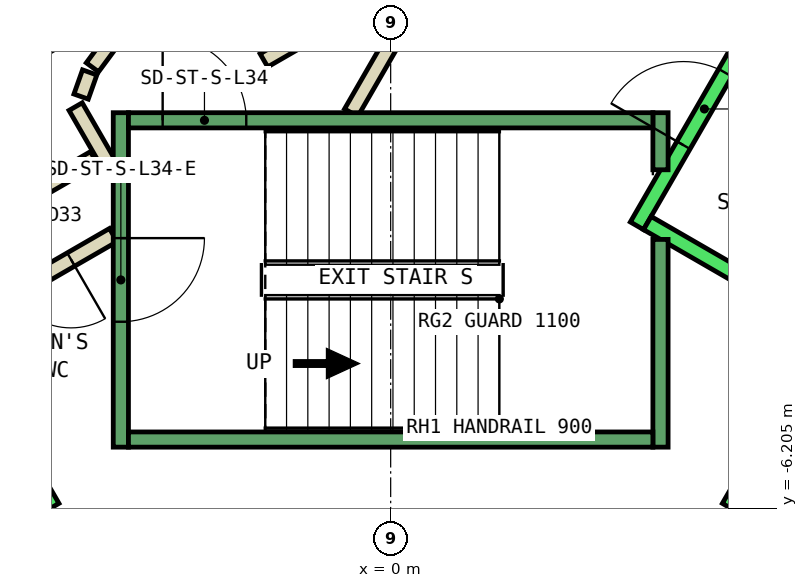
"""IFC4 building model, lengths in metres.
Left out: names, types, materials, properties, quantities, classifications, styles, units other than length and angle.
Written with IfcOpenShell. Run it as: python <this file> out.ifc"""

import sys

from ifc_helpers import new_model, si_unit, direction, frame, frame_2d, origin, place, context, subcontext, project, spatial, rectangle, extrude, element, fill, save


model = new_model("IFC4")
c1 = context("Model", 3, precision=1e-05, world=origin(), true_north=direction((0.0, 1.0)))
c2 = subcontext(c1, "Body", "Model", "MODEL_VIEW")
j1 = project(units=[si_unit("LENGTHUNIT", "METRE"), si_unit("PLANEANGLEUNIT", "RADIAN")], contexts=[c1])
p1 = place(None, origin())
s1 = spatial("IfcSite", under=j1, at=p1, CompositionType="ELEMENT")
p2 = place(p1, origin())
s2 = spatial("IfcBuilding", under=s1, at=p2, CompositionType="ELEMENT")
p3 = place(p2, frame((0.0, 0.0, 155.0)))
s3 = spatial("IfcBuildingStorey", under=s2, at=p3, CompositionType="ELEMENT", Elevation=155.0)
p4 = place(p3, frame((-3.9, -1.599, 0.0), z_axis=(0.0, 0.0, 1.0), x_axis=(-0.865969445389, -0.500096910261, 0.0)))
e1 = element("IfcWall", 1, at=p4, inside=s3, PredefinedType="PARTITIONING", context=c2, shape_type="SweptSolid", body=[
    extrude(rectangle(XDim=1.373, YDim=0.2, at=frame_2d((0.687, 0.0))), origin(), (0.0, 0.0, 1.0), 3.8),
])
p5 = place(p3, frame((-3.65, -2.61, 0.0), z_axis=(0.0, 0.0, 1.0), x_axis=(-0.866072462134, -0.499918483688, 0.0)))
e2 = element("IfcWall", 2, at=p5, inside=s3, PredefinedType="PARTITIONING", context=c2, shape_type="SweptSolid", body=[
    extrude(rectangle(XDim=2.084, YDim=0.2, at=frame_2d((1.042, 0.0))), origin(), (0.0, 0.0, 1.0), 3.8),
])
p6 = place(p5, frame((0.642, 0.0, 0.0)))
e3 = element("IfcOpeningElement", 3, at=p6, cuts=e2, PredefinedType="OPENING", context=c2, shape_type="SweptSolid", body=[
    extrude(rectangle(XDim=0.9, YDim=2.1, at=frame_2d((0.45, 1.05))), frame((0.0, 0.11, 0.0), z_axis=(0.0, -1.0, 0.0), x_axis=(1.0, 0.0, 0.0)), (0.0, 0.0, 1.0), 0.22),
])
p7 = place(p3, frame((-4.145, -0.92, 0.0), z_axis=(0.0, 0.0, 1.0), x_axis=(0.499743786207, -0.866173278362, 0.0)))
e4 = element("IfcWall", 4, at=p7, inside=s3, PredefinedType="PARTITIONING", context=c2, shape_type="SweptSolid", body=[
    extrude(rectangle(XDim=0.991, YDim=0.2, at=frame_2d((0.495, 0.0))), origin(), (0.0, 0.0, 1.0), 3.8),
])
p8 = place(p3, frame((-0.52, -1.0, 0.0), z_axis=(0.0, 0.0, 1.0), x_axis=(0.50011622646, 0.865958290007, 0.0)))
e5 = element("IfcWall", 5, at=p8, inside=s3, PredefinedType="PARTITIONING", context=c2, shape_type="SweptSolid", body=[
    extrude(rectangle(XDim=4.991, YDim=0.2, at=frame_2d((2.496, 0.0))), origin(), (0.0, 0.0, 1.0), 3.8),
])
p9 = place(p8, frame((1.945, 0.0, 0.0)))
e6 = element("IfcOpeningElement", 6, at=p9, cuts=e5, PredefinedType="OPENING", context=c2, shape_type="SweptSolid", body=[
    extrude(rectangle(XDim=1.0, YDim=2.1, at=frame_2d((0.5, 1.05))), frame((0.0, 0.11, 0.0), z_axis=(0.0, -1.0, 0.0), x_axis=(1.0, 0.0, 0.0)), (0.0, 0.0, 1.0), 0.22),
])
p10 = place(p3, frame((-0.412, 0.414, 0.0), z_axis=(0.0, 0.0, 1.0), x_axis=(-0.866017369001, -0.500013916395, 0.0)))
e7 = element("IfcWall", 7, at=p10, inside=s3, PredefinedType="PARTITIONING", context=c2, shape_type="SweptSolid", body=[
    extrude(rectangle(XDim=1.45, YDim=0.2, at=frame_2d((0.725, 0.0))), origin(), (0.0, 0.0, 1.0), 3.8),
])
p11 = place(p3, frame((-3.723, -0.131, 0.0), z_axis=(0.0, 0.0, 1.0), x_axis=(-0.594675113454, -0.803966112121, 0.0)))
e8 = element("IfcWall", 8, at=p11, inside=s3, PredefinedType="PARTITIONING", context=c2, shape_type="SweptSolid", body=[
    extrude(rectangle(XDim=0.338, YDim=0.2, at=frame_2d((0.169, 0.0))), origin(), (0.0, 0.0, 1.0), 3.8),
])
p12 = place(p3, frame((-3.96, -0.47, 0.0), z_axis=(0.0, 0.0, 1.0), x_axis=(-0.334824194261, -0.942280615813, 0.0)))
e9 = element("IfcWall", 9, at=p12, inside=s3, PredefinedType="PARTITIONING", context=c2, shape_type="SweptSolid", body=[
    extrude(rectangle(XDim=0.338, YDim=0.2, at=frame_2d((0.169, 0.0))), origin(), (0.0, 0.0, 1.0), 3.8),
])
p13 = place(p3, frame((-9.751, 2.99, 0.0), z_axis=(0.0, 0.0, 1.0), x_axis=(0.50000090737, -0.866024879913, 0.0)))
e10 = element("IfcWall", 10, at=p13, inside=s3, PredefinedType="STANDARD", context=c2, shape_type="SweptSolid", body=[
    extrude(rectangle(XDim=10.6, YDim=0.2, at=frame_2d((5.3, 0.0))), origin(), (0.0, 0.0, 1.0), 3.8),
])
p14 = place(p3, frame((3.24, -2.488, 0.0), z_axis=(0.0, 0.0, 1.0), x_axis=(0.49994636267, 0.866056369097, 0.0)))
e11 = element("IfcWall", 11, at=p14, inside=s3, PredefinedType="STANDARD", context=c2, shape_type="SweptSolid", body=[
    extrude(rectangle(XDim=2.8, YDim=0.2, at=frame_2d((1.4, 0.0))), origin(), (0.0, 0.0, 1.0), 3.8),
])
p15 = place(p14, frame((1.225, 0.0, 0.0)))
e12 = element("IfcOpeningElement", 12, at=p15, cuts=e11, PredefinedType="OPENING", context=c2, shape_type="SweptSolid", body=[
    extrude(rectangle(XDim=1.1, YDim=2.1, at=frame_2d((0.55, 1.05))), frame((0.0, 0.11, 0.0), z_axis=(0.0, -1.0, 0.0), x_axis=(1.0, 0.0, 0.0)), (0.0, 0.0, 1.0), 0.22),
])
p16 = place(p3, frame((3.377, -2.452, 0.0), z_axis=(0.0, 0.0, 1.0), x_axis=(0.865955154139, -0.50012165622, 0.0)))
e13 = element("IfcWall", 13, at=p16, inside=s3, PredefinedType="STANDARD", context=c2, shape_type="SweptSolid", body=[
    extrude(rectangle(XDim=2.4, YDim=0.2, at=frame_2d((1.2, 0.0))), origin(), (0.0, 0.0, 1.0), 3.8),
])
p17 = place(p3, frame((4.451, -6.19, 0.0), z_axis=(0.0, 0.0, 1.0), x_axis=(0.50000090737, 0.866024879913, 0.0)))
e14 = element("IfcWall", 14, at=p17, inside=s3, PredefinedType="STANDARD", context=c2, shape_type="SweptSolid", body=[
    extrude(rectangle(XDim=10.6, YDim=0.2, at=frame_2d((5.3, 0.0))), origin(), (0.0, 0.0, 1.0), 3.8),
])
p18 = place(p3, frame((-3.55, -1.0, 0.0), z_axis=(0.0, 0.0, 1.0), x_axis=(0.0, -1.0, 0.0)))
e15 = element("IfcWall", 15, at=p18, inside=s3, PredefinedType="STANDARD", context=c2, shape_type="SweptSolid", body=[
    extrude(rectangle(XDim=4.4, YDim=0.2, at=frame_2d((2.2, 0.0))), origin(), (0.0, 0.0, 1.0), 3.8),
])
p19 = place(p18, frame((1.65, 0.0, 0.0)))
e16 = element("IfcOpeningElement", 16, at=p19, cuts=e15, PredefinedType="OPENING", context=c2, shape_type="SweptSolid", body=[
    extrude(rectangle(XDim=1.1, YDim=2.2, at=frame_2d((0.55, 1.1))), frame((0.0, 0.11, 0.0), z_axis=(0.0, -1.0, 0.0), x_axis=(1.0, 0.0, 0.0)), (0.0, 0.0, 1.0), 0.22),
])
p20 = place(p3, frame((3.55, -2.667, 0.0), z_axis=(0.0, 0.0, 1.0), x_axis=(0.0, -1.0, 0.0)))
e17 = element("IfcWall", 17, at=p20, inside=s3, PredefinedType="STANDARD", context=c2, shape_type="SweptSolid", body=[
    extrude(rectangle(XDim=2.733, YDim=0.2, at=frame_2d((1.366, 0.0))), origin(), (0.0, 0.0, 1.0), 3.8),
])
p21 = place(p3, frame((3.55, -1.0, 0.0), z_axis=(0.0, 0.0, 1.0), x_axis=(0.0, -1.0, 0.0)))
e18 = element("IfcWall", 18, at=p21, inside=s3, PredefinedType="STANDARD", context=c2, shape_type="SweptSolid", body=[
    extrude(rectangle(XDim=0.751, YDim=0.2, at=frame_2d((0.375, 0.0))), origin(), (0.0, 0.0, 1.0), 3.8),
])
p22 = place(p3, frame((-3.45, -1.1, 0.0), z_axis=(0.0, 0.0, 1.0), x_axis=(1.0, 0.0, 0.0)))
e19 = element("IfcWall", 19, at=p22, inside=s3, PredefinedType="STANDARD", context=c2, shape_type="SweptSolid", body=[
    extrude(rectangle(XDim=6.9, YDim=0.2, at=frame_2d((3.45, 0.0))), origin(), (0.0, 0.0, 1.0), 3.8),
])
p23 = place(p22, frame((0.45, 0.0, 0.0)))
e20 = element("IfcOpeningElement", 20, at=p23, cuts=e19, PredefinedType="OPENING", context=c2, shape_type="SweptSolid", body=[
    extrude(rectangle(XDim=1.1, YDim=2.2, at=frame_2d((0.55, 1.1))), frame((0.0, 0.11, 0.0), z_axis=(0.0, -1.0, 0.0), x_axis=(1.0, 0.0, 0.0)), (0.0, 0.0, 1.0), 0.22),
])
p24 = place(p3, frame((-3.45, -5.3, 0.0), z_axis=(0.0, 0.0, 1.0), x_axis=(1.0, 0.0, 0.0)))
e21 = element("IfcWall", 21, at=p24, inside=s3, PredefinedType="STANDARD", context=c2, shape_type="SweptSolid", body=[
    extrude(rectangle(XDim=6.9, YDim=0.2, at=frame_2d((3.45, 0.0))), origin(), (0.0, 0.0, 1.0), 3.8),
])
p25 = place(p6, origin())
e22 = element("IfcDoor", 22, at=p25, inside=s3, OperationType="SINGLE_SWING_LEFT", PredefinedType="DOOR", context=c2, shape_type="SweptSolid", body=[
    extrude(rectangle(XDim=0.9, YDim=2.1, at=frame_2d((0.45, 1.05))), frame((0.0, 0.025, 0.0), z_axis=(0.0, -1.0, 0.0), x_axis=(1.0, 0.0, 0.0)), (0.0, 0.0, 1.0), 0.05),
])
fill(e3, e22)
p26 = place(p15, origin())
e23 = element("IfcDoor", 23, at=p26, inside=s3, OperationType="SLIDING_TO_LEFT", PredefinedType="DOOR", context=c2, shape_type="SweptSolid", body=[
    extrude(rectangle(XDim=1.1, YDim=2.1, at=frame_2d((0.55, 1.05))), frame((0.0, 0.025, 0.0), z_axis=(0.0, -1.0, 0.0), x_axis=(1.0, 0.0, 0.0)), (0.0, 0.0, 1.0), 0.05),
])
fill(e12, e23)
p27 = place(p23, origin())
e24 = element("IfcDoor", 24, at=p27, inside=s3, OperationType="SINGLE_SWING_LEFT", PredefinedType="DOOR", context=c2, shape_type="SweptSolid", body=[
    extrude(rectangle(XDim=1.1, YDim=2.2, at=frame_2d((0.55, 1.1))), frame((0.0, 0.025, 0.0), z_axis=(0.0, -1.0, 0.0), x_axis=(1.0, 0.0, 0.0)), (0.0, 0.0, 1.0), 0.05),
])
fill(e20, e24)
p28 = place(p19, origin())
e25 = element("IfcDoor", 25, at=p28, inside=s3, OperationType="SINGLE_SWING_LEFT", PredefinedType="DOOR", context=c2, shape_type="SweptSolid", body=[
    extrude(rectangle(XDim=1.1, YDim=2.2, at=frame_2d((0.55, 1.1))), frame((0.0, 0.025, 0.0), z_axis=(0.0, -1.0, 0.0), x_axis=(1.0, 0.0, 0.0)), (0.0, 0.0, 1.0), 0.05),
])
fill(e16, e25)
save(model, sys.argv[1])
